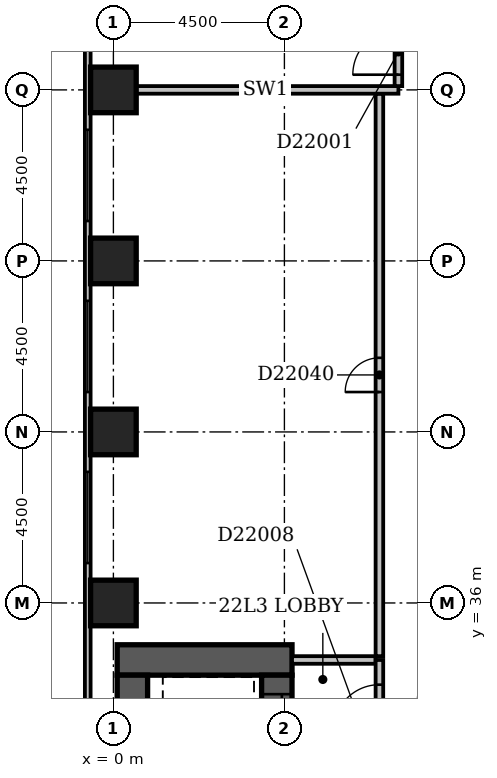
"""IFC4 building model, lengths in metres.
Left out: names, types, materials, properties, quantities, classifications, styles, units other than length and angle.
Written with IfcOpenShell. Run it as: python <this file> out.ifc"""

import sys

from ifc_helpers import new_model, si_unit, direction, frame, frame_2d, origin, origin_2d, place, context, subcontext, project, spatial, rectangle, extrude, element, fill, save


model = new_model("IFC4")
c1 = context("Model", 3, precision=1e-05, world=origin(), true_north=direction((0.0, 1.0)))
c2 = subcontext(c1, "Body", "Model", "MODEL_VIEW")
j1 = project(units=[si_unit("LENGTHUNIT", "METRE"), si_unit("PLANEANGLEUNIT", "RADIAN")], contexts=[c1])
p1 = place(None, origin())
s1 = spatial("IfcSite", under=j1, at=p1, CompositionType="ELEMENT")
p2 = place(p1, origin())
s2 = spatial("IfcBuilding", under=s1, at=p2, CompositionType="ELEMENT")
p3 = place(p2, frame((0.0, 0.0, 90.2)))
s3 = spatial("IfcBuildingStorey", under=s2, at=p3, CompositionType="ELEMENT", Elevation=90.2)
p4 = place(p3, frame((0.1, 34.5, -0.3), z_axis=(0.0, 0.0, 1.0), x_axis=(1.0, 0.0, 0.0)))
e1 = element("IfcWall", 1, at=p4, inside=s3, PredefinedType="SHEAR", context=c2, shape_type="SweptSolid", body=[
    extrude(rectangle(XDim=4.6, YDim=0.8, at=frame_2d((2.3, 0.0))), origin(), (0.0, 0.0, 1.0), 3.6),
])
p5 = place(p3, frame((0.5, 27.15, -0.3), z_axis=(0.0, 0.0, 1.0), x_axis=(0.0, 1.0, 0.0)))
e2 = element("IfcWall", 2, at=p5, inside=s3, PredefinedType="SHEAR", context=c2, shape_type="SweptSolid", body=[
    extrude(rectangle(XDim=6.95, YDim=0.8, at=frame_2d((3.475, 0.0))), origin(), (0.0, 0.0, 1.0), 3.6),
])
p6 = place(p3, frame((4.3, 27.15, -0.3), z_axis=(0.0, 0.0, 1.0), x_axis=(0.0, 1.0, 0.0)))
e3 = element("IfcWall", 3, at=p6, inside=s3, PredefinedType="SHEAR", context=c2, shape_type="SweptSolid", body=[
    extrude(rectangle(XDim=6.95, YDim=0.8, at=frame_2d((3.475, 0.0))), origin(), (0.0, 0.0, 1.0), 3.6),
])
p7 = place(p6, frame((3.05, 0.0, 0.3)))
e4 = element("IfcOpeningElement", 4, at=p7, cuts=e3, PredefinedType="OPENING", context=c2, shape_type="SweptSolid", body=[
    extrude(rectangle(XDim=1.1, YDim=2.1, at=frame_2d((0.55, 1.05))), frame((0.0, 0.412, 0.0), z_axis=(0.0, -1.0, 0.0), x_axis=(1.0, 0.0, 0.0)), (0.0, 0.0, 1.0), 0.824),
])
p8 = place(p6, frame((0.55, 0.0, 0.3)))
e5 = element("IfcOpeningElement", 5, at=p8, cuts=e3, PredefinedType="OPENING", context=c2, shape_type="SweptSolid", body=[
    extrude(rectangle(XDim=1.1, YDim=2.1, at=frame_2d((0.55, 1.05))), frame((0.0, 0.412, 0.0), z_axis=(0.0, -1.0, 0.0), x_axis=(1.0, 0.0, 0.0)), (0.0, 0.0, 1.0), 0.824),
])
p9 = place(p6, frame((5.35, 0.0, 0.3)))
e6 = element("IfcOpeningElement", 6, at=p9, cuts=e3, PredefinedType="OPENING", context=c2, shape_type="SweptSolid", body=[
    extrude(rectangle(XDim=1.1, YDim=2.1, at=frame_2d((0.55, 1.05))), frame((0.0, 0.412, 0.0), z_axis=(0.0, -1.0, 0.0), x_axis=(1.0, 0.0, 0.0)), (0.0, 0.0, 1.0), 0.824),
])
for number, where, z_axis, x_axis in (
    (7, (0.0, 36.0, -0.3), (0.0, 0.0, 1.0), (1.0, 0.0, 0.0)),
    (8, (0.0, 40.5, -0.3), (0.0, 0.0, 1.0), (1.0, 0.0, 0.0)),
    (9, (0.0, 45.0, -0.3), (0.0, 0.0, 1.0), (1.0, 0.0, 0.0)),
    (10, (0.0, 49.5, -0.3), (0.0, 0.0, 1.0), (1.0, 0.0, 0.0)),
):
    element("IfcColumn", number, at=place(p3, frame(where, z_axis=z_axis, x_axis=x_axis)), inside=s3, PredefinedType="COLUMN", context=c2, shape_type="SweptSolid", body=[
        extrude(rectangle(XDim=1.2, YDim=1.2, at=origin_2d()), origin(), (0.0, 0.0, 1.0), 3.6),
    ])
p10 = place(p3, frame((-0.675, 59.1, 0.0), z_axis=(0.0, 0.0, 1.0), x_axis=(0.0, -1.0, 0.0)))
e11 = element("IfcWall", 11, at=p10, inside=s3, PredefinedType="STANDARD", context=c2, shape_type="SweptSolid", body=[
    extrude(rectangle(XDim=55.35, YDim=0.15, at=frame_2d((27.675, 0.0))), origin(), (0.0, 0.0, 1.0), 2.7),
])
p11 = place(p10, frame((10.65, 0.0, 0.6)))
e12 = element("IfcOpeningElement", 12, at=p11, cuts=e11, PredefinedType="OPENING", context=c2, shape_type="SweptSolid", body=[
    extrude(rectangle(XDim=2.4, YDim=1.8, at=frame_2d((1.2, 0.9))), frame((0.0, 0.087, 0.0), z_axis=(0.0, -1.0, 0.0), x_axis=(1.0, 0.0, 0.0)), (0.0, 0.0, 1.0), 0.174),
])
p12 = place(p10, frame((15.15, 0.0, 0.6)))
e13 = element("IfcOpeningElement", 13, at=p12, cuts=e11, PredefinedType="OPENING", context=c2, shape_type="SweptSolid", body=[
    extrude(rectangle(XDim=2.4, YDim=1.8, at=frame_2d((1.2, 0.9))), frame((0.0, 0.087, 0.0), z_axis=(0.0, -1.0, 0.0), x_axis=(1.0, 0.0, 0.0)), (0.0, 0.0, 1.0), 0.174),
])
p13 = place(p10, frame((19.65, 0.0, 0.6)))
e14 = element("IfcOpeningElement", 14, at=p13, cuts=e11, PredefinedType="OPENING", context=c2, shape_type="SweptSolid", body=[
    extrude(rectangle(XDim=2.4, YDim=1.8, at=frame_2d((1.2, 0.9))), frame((0.0, 0.087, 0.0), z_axis=(0.0, -1.0, 0.0), x_axis=(1.0, 0.0, 0.0)), (0.0, 0.0, 1.0), 0.174),
])
p14 = place(p3, frame((7.0, 32.1, 0.0), z_axis=(0.0, 0.0, 1.0), x_axis=(0.0, 1.0, 0.0)))
e15 = element("IfcWall", 15, at=p14, inside=s3, PredefinedType="PARTITIONING", context=c2, shape_type="SweptSolid", body=[
    extrude(rectangle(XDim=2.4, YDim=0.2, at=frame_2d((1.2, 0.0))), origin(), (0.0, 0.0, 1.0), 3.3),
])
p15 = place(p14, frame((0.55, 0.0, 0.0)))
e16 = element("IfcOpeningElement", 16, at=p15, cuts=e15, PredefinedType="OPENING", context=c2, shape_type="SweptSolid", body=[
    extrude(rectangle(XDim=1.2, YDim=2.1, at=frame_2d((0.6, 1.05))), frame((0.0, 0.112, 0.0), z_axis=(0.0, -1.0, 0.0), x_axis=(1.0, 0.0, 0.0)), (0.0, 0.0, 1.0), 0.224),
])
p16 = place(p3, frame((4.7, 34.5, 0.0), z_axis=(0.0, 0.0, 1.0), x_axis=(1.0, 0.0, 0.0)))
e17 = element("IfcWall", 17, at=p16, inside=s3, PredefinedType="PARTITIONING", context=c2, shape_type="SweptSolid", body=[
    extrude(rectangle(XDim=2.2, YDim=0.2, at=frame_2d((1.1, 0.0))), origin(), (0.0, 0.0, 1.0), 3.3),
])
p17 = place(p3, frame((0.5, 49.5, 0.0), z_axis=(0.0, 0.0, 1.0), x_axis=(1.0, 0.0, 0.0)))
e18 = element("IfcWall", 18, at=p17, inside=s3, PredefinedType="PARTITIONING", context=c2, shape_type="SweptSolid", body=[
    extrude(rectangle(XDim=7.0, YDim=0.2, at=frame_2d((3.5, 0.0))), origin(), (0.0, 0.0, 1.0), 3.3),
])
p18 = place(p3, frame((7.5, 49.6, 0.0), z_axis=(0.0, 0.0, 1.0), x_axis=(0.0, 1.0, 0.0)))
e19 = element("IfcWall", 19, at=p18, inside=s3, PredefinedType="PARTITIONING", context=c2, shape_type="SweptSolid", body=[
    extrude(rectangle(XDim=3.9, YDim=0.2, at=frame_2d((1.95, 0.0))), origin(), (0.0, 0.0, 1.0), 3.3),
])
p19 = place(p18, frame((0.3, 0.0, 0.0)))
e20 = element("IfcOpeningElement", 20, at=p19, cuts=e19, PredefinedType="OPENING", context=c2, shape_type="SweptSolid", body=[
    extrude(rectangle(XDim=1.2, YDim=2.1, at=frame_2d((0.6, 1.05))), frame((0.0, 0.112, 0.0), z_axis=(0.0, -1.0, 0.0), x_axis=(1.0, 0.0, 0.0)), (0.0, 0.0, 1.0), 0.224),
])
p20 = place(p3, frame((7.0, 34.6, 0.0), z_axis=(0.0, 0.0, 1.0), x_axis=(0.0, 1.0, 0.0)))
e21 = element("IfcWall", 21, at=p20, inside=s3, PredefinedType="PARTITIONING", context=c2, shape_type="SweptSolid", body=[
    extrude(rectangle(XDim=14.8, YDim=0.2, at=frame_2d((7.4, 0.0))), origin(), (0.0, 0.0, 1.0), 3.3),
])
p21 = place(p20, frame((6.95, 0.0, 0.0)))
e22 = element("IfcOpeningElement", 22, at=p21, cuts=e21, PredefinedType="OPENING", context=c2, shape_type="SweptSolid", body=[
    extrude(rectangle(XDim=0.9, YDim=2.1, at=frame_2d((0.45, 1.05))), frame((0.0, 0.112, 0.0), z_axis=(0.0, -1.0, 0.0), x_axis=(1.0, 0.0, 0.0)), (0.0, 0.0, 1.0), 0.224),
])
p22 = place(p11, origin())
e23 = element("IfcWindow", 23, at=p22, inside=s3, PartitioningType="SINGLE_PANEL", PredefinedType="WINDOW", context=c2, shape_type="SweptSolid", body=[
    extrude(rectangle(XDim=2.4, YDim=1.8, at=frame_2d((1.2, 0.9))), frame((0.0, 0.03, 0.0), z_axis=(0.0, -1.0, 0.0), x_axis=(1.0, 0.0, 0.0)), (0.0, 0.0, 1.0), 0.06),
])
fill(e12, e23)
p23 = place(p12, origin())
e24 = element("IfcWindow", 24, at=p23, inside=s3, PartitioningType="SINGLE_PANEL", PredefinedType="WINDOW", context=c2, shape_type="SweptSolid", body=[
    extrude(rectangle(XDim=2.4, YDim=1.8, at=frame_2d((1.2, 0.9))), frame((0.0, 0.03, 0.0), z_axis=(0.0, -1.0, 0.0), x_axis=(1.0, 0.0, 0.0)), (0.0, 0.0, 1.0), 0.06),
])
fill(e13, e24)
p24 = place(p13, origin())
e25 = element("IfcWindow", 25, at=p24, inside=s3, PartitioningType="SINGLE_PANEL", PredefinedType="WINDOW", context=c2, shape_type="SweptSolid", body=[
    extrude(rectangle(XDim=2.4, YDim=1.8, at=frame_2d((1.2, 0.9))), frame((0.0, 0.03, 0.0), z_axis=(0.0, -1.0, 0.0), x_axis=(1.0, 0.0, 0.0)), (0.0, 0.0, 1.0), 0.06),
])
fill(e14, e25)
p25 = place(p19, origin())
e26 = element("IfcDoor", 26, at=p25, inside=s3, OperationType="SINGLE_SWING_LEFT", PredefinedType="DOOR", context=c2, shape_type="SweptSolid", body=[
    extrude(rectangle(XDim=1.2, YDim=2.1, at=frame_2d((0.6, 1.05))), frame((0.0, 0.025, 0.0), z_axis=(0.0, -1.0, 0.0), x_axis=(1.0, 0.0, 0.0)), (0.0, 0.0, 1.0), 0.05),
])
fill(e20, e26)
p26 = place(p15, origin())
e27 = element("IfcDoor", 27, at=p26, inside=s3, OperationType="SINGLE_SWING_LEFT", PredefinedType="DOOR", context=c2, shape_type="SweptSolid", body=[
    extrude(rectangle(XDim=1.2, YDim=2.1, at=frame_2d((0.6, 1.05))), frame((0.0, 0.025, 0.0), z_axis=(0.0, -1.0, 0.0), x_axis=(1.0, 0.0, 0.0)), (0.0, 0.0, 1.0), 0.05),
])
fill(e16, e27)
p27 = place(p9, origin())
e28 = element("IfcDoor", 28, at=p27, inside=s3, OperationType="SLIDING_TO_LEFT", PredefinedType="DOOR", context=c2, shape_type="SweptSolid", body=[
    extrude(rectangle(XDim=1.1, YDim=2.1, at=frame_2d((0.55, 1.05))), frame((0.0, 0.025, 0.0), z_axis=(0.0, -1.0, 0.0), x_axis=(1.0, 0.0, 0.0)), (0.0, 0.0, 1.0), 0.05),
])
fill(e6, e28)
p28 = place(p21, origin())
e29 = element("IfcDoor", 29, at=p28, inside=s3, OperationType="SINGLE_SWING_LEFT", PredefinedType="DOOR", context=c2, shape_type="SweptSolid", body=[
    extrude(rectangle(XDim=0.9, YDim=2.1, at=frame_2d((0.45, 1.05))), frame((0.0, 0.025, 0.0), z_axis=(0.0, -1.0, 0.0), x_axis=(1.0, 0.0, 0.0)), (0.0, 0.0, 1.0), 0.05),
])
fill(e22, e29)
save(model, sys.argv[1])
